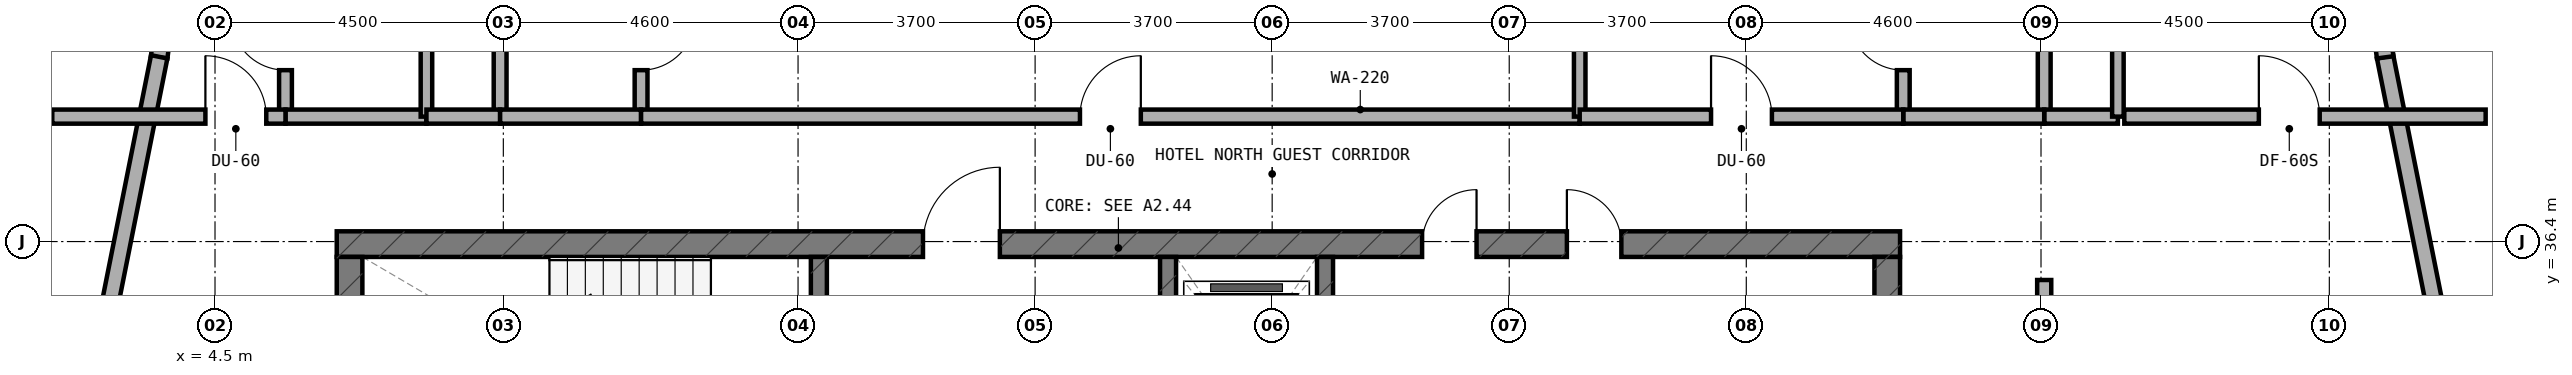
"""IFC4 building model, lengths in metres.
Left out: names, types, materials, properties, quantities, classifications, styles, units other than length and angle.
Written with IfcOpenShell. Run it as: python <this file> out.ifc"""

import sys

from ifc_helpers import new_model, si_unit, direction, frame, frame_2d, origin, place, context, subcontext, project, spatial, rectangle, extrude, element, fill, save


model = new_model("IFC4")
c1 = context("Model", 3, precision=1e-05, world=origin(), true_north=direction((0.0, 1.0)))
c2 = subcontext(c1, "Body", "Model", "MODEL_VIEW")
j1 = project(units=[si_unit("LENGTHUNIT", "METRE"), si_unit("PLANEANGLEUNIT", "RADIAN")], contexts=[c1])
p1 = place(None, origin())
s1 = spatial("IfcSite", under=j1, at=p1, CompositionType="ELEMENT")
p2 = place(p1, origin())
s2 = spatial("IfcBuilding", under=s1, at=p2, CompositionType="ELEMENT")
p3 = place(p2, frame((0.0, 0.0, 202.7)))
s3 = spatial("IfcBuildingStorey", under=s2, at=p3, CompositionType="ELEMENT", Elevation=202.7)
p4 = place(p3, frame((6.4, 36.36, 0.0), z_axis=(0.0, 0.0, 1.0), x_axis=(1.0, 0.0, 0.0)))
e1 = element("IfcWall", 1, at=p4, inside=s3, PredefinedType="SHEAR", context=c2, shape_type="SweptSolid", body=[
    extrude(rectangle(XDim=24.4, YDim=0.4, at=frame_2d((12.2, 0.0))), origin(), (0.0, 0.0, 1.0), 3.6),
])
p5 = place(p4, frame((9.15, 0.0, 0.0)))
e2 = element("IfcOpeningElement", 2, at=p5, cuts=e1, PredefinedType="OPENING", context=c2, shape_type="SweptSolid", body=[
    extrude(rectangle(XDim=1.2, YDim=2.15, at=frame_2d((0.6, 1.075))), frame((0.0, 0.21, 0.0), z_axis=(0.0, -1.0, 0.0), x_axis=(1.0, 0.0, 0.0)), (0.0, 0.0, 1.0), 0.42),
])
p6 = place(p4, frame((19.2, 0.0, 0.0)))
e3 = element("IfcOpeningElement", 3, at=p6, cuts=e1, PredefinedType="OPENING", context=c2, shape_type="SweptSolid", body=[
    extrude(rectangle(XDim=0.85, YDim=2.1, at=frame_2d((0.425, 1.05))), frame((0.0, 0.21, 0.0), z_axis=(0.0, -1.0, 0.0), x_axis=(1.0, 0.0, 0.0)), (0.0, 0.0, 1.0), 0.42),
])
p7 = place(p4, frame((16.94, 0.0, 0.0)))
e4 = element("IfcOpeningElement", 4, at=p7, cuts=e1, PredefinedType="OPENING", context=c2, shape_type="SweptSolid", body=[
    extrude(rectangle(XDim=0.85, YDim=2.1, at=frame_2d((0.425, 1.05))), frame((0.0, 0.21, 0.0), z_axis=(0.0, -1.0, 0.0), x_axis=(1.0, 0.0, 0.0)), (0.0, 0.0, 1.0), 0.42),
])
for number, where, z_axis, x_axis in (
    (5, (6.6, 33.0, 0.0), (0.0, 0.0, 1.0), (0.0, 1.0, 0.0)),
    (6, (30.6, 33.0, 0.0), (0.0, 0.0, 1.0), (0.0, 1.0, 0.0)),
):
    element("IfcWall", number, at=place(p3, frame(where, z_axis=z_axis, x_axis=x_axis)), inside=s3, PredefinedType="SHEAR", context=c2, shape_type="SweptSolid", body=[
        extrude(rectangle(XDim=3.16, YDim=0.4, at=frame_2d((1.58, 0.0))), origin(), (0.0, 0.0, 1.0), 3.6),
    ])
p8 = place(p3, frame((13.925, 33.0, 0.0), z_axis=(0.0, 0.0, 1.0), x_axis=(0.0, 1.0, 0.0)))
e7 = element("IfcWall", 7, at=p8, inside=s3, PredefinedType="STANDARD", context=c2, shape_type="SweptSolid", body=[
    extrude(rectangle(XDim=3.16, YDim=0.25, at=frame_2d((1.58, 0.0))), origin(), (0.0, 0.0, 1.0), 3.32),
])
p9 = place(p8, frame((0.98, 0.0, 0.0)))
e8 = element("IfcOpeningElement", 8, at=p9, cuts=e7, PredefinedType="OPENING", context=c2, shape_type="SweptSolid", body=[
    extrude(rectangle(XDim=1.1, YDim=2.15, at=frame_2d((0.55, 1.075))), frame((0.0, 0.135, 0.0), z_axis=(0.0, -1.0, 0.0), x_axis=(1.0, 0.0, 0.0)), (0.0, 0.0, 1.0), 0.27),
])
p10 = place(p3, frame((19.375, 33.0, 0.0), z_axis=(0.0, 0.0, 1.0), x_axis=(0.0, 1.0, 0.0)))
e9 = element("IfcWall", 9, at=p10, inside=s3, PredefinedType="STANDARD", context=c2, shape_type="SweptSolid", body=[
    extrude(rectangle(XDim=3.16, YDim=0.25, at=frame_2d((1.58, 0.0))), origin(), (0.0, 0.0, 1.0), 3.32),
])
p11 = place(p10, frame((0.98, 0.0, 0.0)))
e10 = element("IfcOpeningElement", 10, at=p11, cuts=e9, PredefinedType="OPENING", context=c2, shape_type="SweptSolid", body=[
    extrude(rectangle(XDim=1.1, YDim=2.15, at=frame_2d((0.55, 1.075))), frame((0.0, 0.135, 0.0), z_axis=(0.0, -1.0, 0.0), x_axis=(1.0, 0.0, 0.0)), (0.0, 0.0, 1.0), 0.27),
])
p12 = place(p3, frame((21.825, 33.0, 0.0), z_axis=(0.0, 0.0, 1.0), x_axis=(0.0, 1.0, 0.0)))
e11 = element("IfcWall", 11, at=p12, inside=s3, PredefinedType="STANDARD", context=c2, shape_type="SweptSolid", body=[
    extrude(rectangle(XDim=3.16, YDim=0.25, at=frame_2d((1.58, 0.0))), origin(), (0.0, 0.0, 1.0), 3.32),
])
p13 = place(p3, frame((40.084, 30.681, 0.0), z_axis=(0.0, 0.0, 1.0), x_axis=(-0.195291715883, 0.980745199176, 0.0)))
e12 = element("IfcWall", 12, at=p13, inside=s3, PredefinedType="STANDARD", context=c2, shape_type="SweptSolid", body=[
    extrude(rectangle(XDim=8.771, YDim=0.26, at=frame_2d((4.385, 0.0))), origin(), (0.0, 0.0, 1.0), 3.32),
])
p14 = place(p13, frame((2.798, 0.0, 0.85)))
e13 = element("IfcOpeningElement", 13, at=p14, cuts=e12, PredefinedType="OPENING", context=c2, shape_type="SweptSolid", body=[
    extrude(rectangle(XDim=2.1, YDim=1.5, at=frame_2d((1.05, 0.75))), frame((0.0, 0.14, 0.0), z_axis=(0.0, -1.0, 0.0), x_axis=(1.0, 0.0, 0.0)), (0.0, 0.0, 1.0), 0.28),
])
p15 = place(p3, frame((38.372, 39.275, 0.0), z_axis=(0.0, 0.0, 1.0), x_axis=(-0.130954667764, 0.9913883573, 0.0)))
e14 = element("IfcWall", 14, at=p15, inside=s3, PredefinedType="STANDARD", context=c2, shape_type="SweptSolid", body=[
    extrude(rectangle(XDim=0.833, YDim=0.26, at=frame_2d((0.417, 0.0))), origin(), (0.0, 0.0, 1.0), 3.32),
])
p16 = place(p3, frame((3.741, 40.136, 0.0), z_axis=(0.0, 0.0, 1.0), x_axis=(-0.130156359936, -0.991493480548, 0.0)))
e15 = element("IfcWall", 15, at=p16, inside=s3, PredefinedType="STANDARD", context=c2, shape_type="SweptSolid", body=[
    extrude(rectangle(XDim=0.868, YDim=0.26, at=frame_2d((0.434, 0.0))), origin(), (0.0, 0.0, 1.0), 3.32),
])
p17 = place(p16, frame((0.209, 0.0, 0.85)))
e16 = element("IfcOpeningElement", 16, at=p17, cuts=e15, PredefinedType="OPENING", context=c2, shape_type="SweptSolid", body=[
    extrude(rectangle(XDim=0.45, YDim=1.5, at=frame_2d((0.225, 0.75))), frame((0.0, 0.14, 0.0), z_axis=(0.0, -1.0, 0.0), x_axis=(1.0, 0.0, 0.0)), (0.0, 0.0, 1.0), 0.28),
])
p18 = place(p3, frame((3.629, 39.283, 0.0), z_axis=(0.0, 0.0, 1.0), x_axis=(-0.195291715883, -0.980745199176, 0.0)))
e17 = element("IfcWall", 17, at=p18, inside=s3, PredefinedType="STANDARD", context=c2, shape_type="SweptSolid", body=[
    extrude(rectangle(XDim=8.771, YDim=0.26, at=frame_2d((4.385, 0.0))), origin(), (0.0, 0.0, 1.0), 3.32),
])
p19 = place(p18, frame((3.873, 0.0, 0.85)))
e18 = element("IfcOpeningElement", 18, at=p19, cuts=e17, PredefinedType="OPENING", context=c2, shape_type="SweptSolid", body=[
    extrude(rectangle(XDim=2.1, YDim=1.5, at=frame_2d((1.05, 0.75))), frame((0.0, 0.14, 0.0), z_axis=(0.0, -1.0, 0.0), x_axis=(1.0, 0.0, 0.0)), (0.0, 0.0, 1.0), 0.28),
])
p20 = place(p3, frame((5.6, 38.45, 0.0), z_axis=(0.0, 0.0, 1.0), x_axis=(0.0, 1.0, 0.0)))
e19 = element("IfcWall", 19, at=p20, inside=s3, PredefinedType="PLUMBINGWALL", context=c2, shape_type="SweptSolid", body=[
    extrude(rectangle(XDim=2.1, YDim=0.2, at=frame_2d((1.05, 0.0))), origin(), (0.0, 0.0, 1.0), 3.32),
])
p21 = place(p20, frame((0.625, 0.0, 0.0)))
e20 = element("IfcOpeningElement", 20, at=p21, cuts=e19, PredefinedType="OPENING", context=c2, shape_type="SweptSolid", body=[
    extrude(rectangle(XDim=0.85, YDim=2.1, at=frame_2d((0.425, 1.05))), frame((0.0, 0.11, 0.0), z_axis=(0.0, -1.0, 0.0), x_axis=(1.0, 0.0, 0.0)), (0.0, 0.0, 1.0), 0.22),
])
p22 = place(p3, frame((5.6, 38.35, 0.0), z_axis=(0.0, 0.0, 1.0), x_axis=(1.0, 0.0, 0.0)))
e21 = element("IfcWall", 21, at=p22, inside=s3, PredefinedType="SOLIDWALL", context=c2, shape_type="SweptSolid", body=[
    extrude(rectangle(XDim=2.2, YDim=0.22, at=frame_2d((1.1, 0.0))), origin(), (0.0, 0.0, 1.0), 2.695),
])
p23 = place(p3, frame((1.96, 38.35, 0.0), z_axis=(0.0, 0.0, 1.0), x_axis=(1.0, 0.0, 0.0)))
e22 = element("IfcWall", 22, at=p23, inside=s3, PredefinedType="SOLIDWALL", context=c2, shape_type="SweptSolid", body=[
    extrude(rectangle(XDim=3.64, YDim=0.22, at=frame_2d((1.82, 0.0))), origin(), (0.0, 0.0, 1.0), 3.32),
])
p24 = place(p23, frame((2.39, 0.0, 0.0)))
e23 = element("IfcOpeningElement", 23, at=p24, cuts=e22, PredefinedType="OPENING", context=c2, shape_type="SweptSolid", body=[
    extrude(rectangle(XDim=0.95, YDim=2.1, at=frame_2d((0.475, 1.05))), frame((0.0, 0.12, 0.0), z_axis=(0.0, -1.0, 0.0), x_axis=(1.0, 0.0, 0.0)), (0.0, 0.0, 1.0), 0.24),
])
p25 = place(p3, frame((7.8, 38.35, 0.0), z_axis=(0.0, 0.0, 1.0), x_axis=(0.0, 1.0, 0.0)))
e24 = element("IfcWall", 24, at=p25, inside=s3, PredefinedType="SOLIDWALL", context=c2, shape_type="SweptSolid", body=[
    extrude(rectangle(XDim=4.308, YDim=0.18, at=frame_2d((2.154, 0.0))), origin(), (0.0, 0.0, 1.0), 2.695),
])
p26 = place(p3, frame((11.15, 38.45, 0.0), z_axis=(0.0, 0.0, 1.0), x_axis=(0.0, 1.0, 0.0)))
e25 = element("IfcWall", 25, at=p26, inside=s3, PredefinedType="PLUMBINGWALL", context=c2, shape_type="SweptSolid", body=[
    extrude(rectangle(XDim=2.1, YDim=0.2, at=frame_2d((1.05, 0.0))), origin(), (0.0, 0.0, 1.0), 2.845),
])
p27 = place(p26, frame((0.625, 0.0, 0.0)))
e26 = element("IfcOpeningElement", 26, at=p27, cuts=e25, PredefinedType="OPENING", context=c2, shape_type="SweptSolid", body=[
    extrude(rectangle(XDim=0.85, YDim=2.1, at=frame_2d((0.425, 1.05))), frame((0.0, 0.11, 0.0), z_axis=(0.0, -1.0, 0.0), x_axis=(1.0, 0.0, 0.0)), (0.0, 0.0, 1.0), 0.22),
])
p28 = place(p3, frame((8.95, 38.45, 0.0), z_axis=(0.0, 0.0, 1.0), x_axis=(0.0, 1.0, 0.0)))
e27 = element("IfcWall", 27, at=p28, inside=s3, PredefinedType="PLUMBINGWALL", context=c2, shape_type="SweptSolid", body=[
    extrude(rectangle(XDim=2.1, YDim=0.2, at=frame_2d((1.05, 0.0))), origin(), (0.0, 0.0, 1.0), 2.845),
])
p29 = place(p3, frame((7.8, 38.35, 0.0), z_axis=(0.0, 0.0, 1.0), x_axis=(1.0, 0.0, 0.0)))
e28 = element("IfcWall", 28, at=p29, inside=s3, PredefinedType="SOLIDWALL", context=c2, shape_type="SweptSolid", body=[
    extrude(rectangle(XDim=1.15, YDim=0.22, at=frame_2d((0.575, 0.0))), origin(), (0.0, 0.0, 1.0), 2.695),
])
p30 = place(p3, frame((8.95, 38.35, 0.0), z_axis=(0.0, 0.0, 1.0), x_axis=(1.0, 0.0, 0.0)))
e29 = element("IfcWall", 29, at=p30, inside=s3, PredefinedType="SOLIDWALL", context=c2, shape_type="SweptSolid", body=[
    extrude(rectangle(XDim=2.2, YDim=0.22, at=frame_2d((1.1, 0.0))), origin(), (0.0, 0.0, 1.0), 3.32),
])
p31 = place(p3, frame((11.15, 38.35, 0.0), z_axis=(0.0, 0.0, 1.0), x_axis=(1.0, 0.0, 0.0)))
e30 = element("IfcWall", 30, at=p31, inside=s3, PredefinedType="SOLIDWALL", context=c2, shape_type="SweptSolid", body=[
    extrude(rectangle(XDim=14.65, YDim=0.22, at=frame_2d((7.325, 0.0))), origin(), (0.0, 0.0, 1.0), 2.695),
])
p32 = place(p31, frame((6.85, 0.0, 0.0)))
e31 = element("IfcOpeningElement", 31, at=p32, cuts=e30, PredefinedType="OPENING", context=c2, shape_type="SweptSolid", body=[
    extrude(rectangle(XDim=0.95, YDim=2.1, at=frame_2d((0.475, 1.05))), frame((0.0, 0.12, 0.0), z_axis=(0.0, -1.0, 0.0), x_axis=(1.0, 0.0, 0.0)), (0.0, 0.0, 1.0), 0.24),
])
p33 = place(p3, frame((25.8, 38.35, 0.0), z_axis=(0.0, 0.0, 1.0), x_axis=(0.0, 1.0, 0.0)))
e32 = element("IfcWall", 32, at=p33, inside=s3, PredefinedType="SOLIDWALL", context=c2, shape_type="SweptSolid", body=[
    extrude(rectangle(XDim=5.79, YDim=0.18, at=frame_2d((2.895, 0.0))), origin(), (0.0, 0.0, 1.0), 2.695),
])
p34 = place(p3, frame((30.85, 38.45, 0.0), z_axis=(0.0, 0.0, 1.0), x_axis=(0.0, 1.0, 0.0)))
e33 = element("IfcWall", 33, at=p34, inside=s3, PredefinedType="PLUMBINGWALL", context=c2, shape_type="SweptSolid", body=[
    extrude(rectangle(XDim=2.1, YDim=0.2, at=frame_2d((1.05, 0.0))), origin(), (0.0, 0.0, 1.0), 2.845),
])
p35 = place(p34, frame((0.625, 0.0, 0.0)))
e34 = element("IfcOpeningElement", 34, at=p35, cuts=e33, PredefinedType="OPENING", context=c2, shape_type="SweptSolid", body=[
    extrude(rectangle(XDim=0.85, YDim=2.1, at=frame_2d((0.425, 1.05))), frame((0.0, 0.11, 0.0), z_axis=(0.0, -1.0, 0.0), x_axis=(1.0, 0.0, 0.0)), (0.0, 0.0, 1.0), 0.22),
])
p36 = place(p3, frame((33.05, 38.45, 0.0), z_axis=(0.0, 0.0, 1.0), x_axis=(0.0, 1.0, 0.0)))
e35 = element("IfcWall", 35, at=p36, inside=s3, PredefinedType="PLUMBINGWALL", context=c2, shape_type="SweptSolid", body=[
    extrude(rectangle(XDim=2.1, YDim=0.2, at=frame_2d((1.05, 0.0))), origin(), (0.0, 0.0, 1.0), 2.845),
])
p37 = place(p3, frame((33.05, 38.35, 0.0), z_axis=(0.0, 0.0, 1.0), x_axis=(1.0, 0.0, 0.0)))
e36 = element("IfcWall", 36, at=p37, inside=s3, PredefinedType="SOLIDWALL", context=c2, shape_type="SweptSolid", body=[
    extrude(rectangle(XDim=1.15, YDim=0.22, at=frame_2d((0.575, 0.0))), origin(), (0.0, 0.0, 1.0), 2.695),
])
p38 = place(p3, frame((30.85, 38.35, 0.0), z_axis=(0.0, 0.0, 1.0), x_axis=(1.0, 0.0, 0.0)))
e37 = element("IfcWall", 37, at=p38, inside=s3, PredefinedType="SOLIDWALL", context=c2, shape_type="SweptSolid", body=[
    extrude(rectangle(XDim=2.2, YDim=0.22, at=frame_2d((1.1, 0.0))), origin(), (0.0, 0.0, 1.0), 3.32),
])
p39 = place(p3, frame((25.8, 38.35, 0.0), z_axis=(0.0, 0.0, 1.0), x_axis=(1.0, 0.0, 0.0)))
e38 = element("IfcWall", 38, at=p39, inside=s3, PredefinedType="SOLIDWALL", context=c2, shape_type="SweptSolid", body=[
    extrude(rectangle(XDim=5.05, YDim=0.22, at=frame_2d((2.525, 0.0))), origin(), (0.0, 0.0, 1.0), 2.695),
])
p40 = place(p39, frame((2.05, 0.0, 0.0)))
e39 = element("IfcOpeningElement", 39, at=p40, cuts=e38, PredefinedType="OPENING", context=c2, shape_type="SweptSolid", body=[
    extrude(rectangle(XDim=0.95, YDim=2.1, at=frame_2d((0.475, 1.05))), frame((0.0, 0.12, 0.0), z_axis=(0.0, -1.0, 0.0), x_axis=(1.0, 0.0, 0.0)), (0.0, 0.0, 1.0), 0.24),
])
p41 = place(p3, frame((34.2, 38.35, 0.0), z_axis=(0.0, 0.0, 1.0), x_axis=(0.0, 1.0, 0.0)))
e40 = element("IfcWall", 40, at=p41, inside=s3, PredefinedType="SOLIDWALL", context=c2, shape_type="SweptSolid", body=[
    extrude(rectangle(XDim=4.308, YDim=0.18, at=frame_2d((2.154, 0.0))), origin(), (0.0, 0.0, 1.0), 2.695),
])
p42 = place(p3, frame((34.3, 38.35, 0.0), z_axis=(0.0, 0.0, 1.0), x_axis=(1.0, 0.0, 0.0)))
e41 = element("IfcWall", 41, at=p42, inside=s3, PredefinedType="SOLIDWALL", context=c2, shape_type="SweptSolid", body=[
    extrude(rectangle(XDim=5.64, YDim=0.22, at=frame_2d((2.82, 0.0))), origin(), (0.0, 0.0, 1.0), 3.015),
])
p43 = place(p42, frame((2.1, 0.0, 0.0)))
e42 = element("IfcOpeningElement", 42, at=p43, cuts=e41, PredefinedType="OPENING", context=c2, shape_type="SweptSolid", body=[
    extrude(rectangle(XDim=0.95, YDim=2.1, at=frame_2d((0.475, 1.05))), frame((0.0, 0.12, 0.0), z_axis=(0.0, -1.0, 0.0), x_axis=(1.0, 0.0, 0.0)), (0.0, 0.0, 1.0), 0.24),
])
p44 = place(p3, frame((33.05, 30.593, 0.0), z_axis=(0.0, 0.0, 1.0), x_axis=(0.0, 1.0, 0.0)))
e43 = element("IfcWall", 43, at=p44, inside=s3, PredefinedType="SOLIDWALL", context=c2, shape_type="SweptSolid", body=[
    extrude(rectangle(XDim=5.207, YDim=0.22, at=frame_2d((2.604, 0.0))), origin(), (0.0, 0.0, 1.0), 2.695),
])
p45 = place(p44, frame((2.128, 0.0, 0.0)))
e44 = element("IfcOpeningElement", 44, at=p45, cuts=e43, PredefinedType="OPENING", context=c2, shape_type="SweptSolid", body=[
    extrude(rectangle(XDim=0.95, YDim=2.1, at=frame_2d((0.475, 1.05))), frame((0.0, 0.12, 0.0), z_axis=(0.0, -1.0, 0.0), x_axis=(1.0, 0.0, 0.0)), (0.0, 0.0, 1.0), 0.24),
])
p46 = place(p5, origin())
e45 = element("IfcDoor", 45, at=p46, inside=s3, OperationType="SINGLE_SWING_RIGHT", PredefinedType="DOOR", context=c2, shape_type="SweptSolid", body=[
    extrude(rectangle(XDim=1.2, YDim=2.15, at=frame_2d((0.6, 1.075))), frame((0.0, 0.025, 0.0), z_axis=(0.0, -1.0, 0.0), x_axis=(1.0, 0.0, 0.0)), (0.0, 0.0, 1.0), 0.05),
])
fill(e2, e45)
p47 = place(p6, origin())
e46 = element("IfcDoor", 46, at=p47, inside=s3, OperationType="SINGLE_SWING_LEFT", PredefinedType="DOOR", context=c2, shape_type="SweptSolid", body=[
    extrude(rectangle(XDim=0.85, YDim=2.1, at=frame_2d((0.425, 1.05))), frame((0.0, 0.025, 0.0), z_axis=(0.0, -1.0, 0.0), x_axis=(1.0, 0.0, 0.0)), (0.0, 0.0, 1.0), 0.05),
])
fill(e3, e46)
p48 = place(p7, origin())
e47 = element("IfcDoor", 47, at=p48, inside=s3, OperationType="SINGLE_SWING_RIGHT", PredefinedType="DOOR", context=c2, shape_type="SweptSolid", body=[
    extrude(rectangle(XDim=0.85, YDim=2.1, at=frame_2d((0.425, 1.05))), frame((0.0, 0.025, 0.0), z_axis=(0.0, -1.0, 0.0), x_axis=(1.0, 0.0, 0.0)), (0.0, 0.0, 1.0), 0.05),
])
fill(e4, e47)
p49 = place(p21, origin())
e48 = element("IfcDoor", 48, at=p49, inside=s3, OperationType="SINGLE_SWING_RIGHT", PredefinedType="DOOR", context=c2, shape_type="SweptSolid", body=[
    extrude(rectangle(XDim=0.85, YDim=2.1, at=frame_2d((0.425, 1.05))), frame((0.0, 0.025, 0.0), z_axis=(0.0, -1.0, 0.0), x_axis=(1.0, 0.0, 0.0)), (0.0, 0.0, 1.0), 0.05),
])
fill(e20, e48)
p50 = place(p24, origin())
e49 = element("IfcDoor", 49, at=p50, inside=s3, OperationType="SINGLE_SWING_LEFT", PredefinedType="DOOR", context=c2, shape_type="SweptSolid", body=[
    extrude(rectangle(XDim=0.95, YDim=2.1, at=frame_2d((0.475, 1.05))), frame((0.0, 0.025, 0.0), z_axis=(0.0, -1.0, 0.0), x_axis=(1.0, 0.0, 0.0)), (0.0, 0.0, 1.0), 0.05),
])
fill(e23, e49)
p51 = place(p27, frame((0.85, 0.0, 0.0), z_axis=(0.0, 0.0, 1.0), x_axis=(-1.0, 0.0, 0.0)))
e50 = element("IfcDoor", 50, at=p51, inside=s3, OperationType="SINGLE_SWING_LEFT", PredefinedType="DOOR", context=c2, shape_type="SweptSolid", body=[
    extrude(rectangle(XDim=0.85, YDim=2.1, at=frame_2d((0.425, 1.05))), frame((0.0, 0.025, 0.0), z_axis=(0.0, -1.0, 0.0), x_axis=(1.0, 0.0, 0.0)), (0.0, 0.0, 1.0), 0.05),
])
fill(e26, e50)
p52 = place(p32, origin())
e51 = element("IfcDoor", 51, at=p52, inside=s3, OperationType="SINGLE_SWING_RIGHT", PredefinedType="DOOR", context=c2, shape_type="SweptSolid", body=[
    extrude(rectangle(XDim=0.95, YDim=2.1, at=frame_2d((0.475, 1.05))), frame((0.0, 0.025, 0.0), z_axis=(0.0, -1.0, 0.0), x_axis=(1.0, 0.0, 0.0)), (0.0, 0.0, 1.0), 0.05),
])
fill(e31, e51)
p53 = place(p35, origin())
e52 = element("IfcDoor", 52, at=p53, inside=s3, OperationType="SINGLE_SWING_RIGHT", PredefinedType="DOOR", context=c2, shape_type="SweptSolid", body=[
    extrude(rectangle(XDim=0.85, YDim=2.1, at=frame_2d((0.425, 1.05))), frame((0.0, 0.025, 0.0), z_axis=(0.0, -1.0, 0.0), x_axis=(1.0, 0.0, 0.0)), (0.0, 0.0, 1.0), 0.05),
])
fill(e34, e52)
p54 = place(p40, origin())
e53 = element("IfcDoor", 53, at=p54, inside=s3, OperationType="SINGLE_SWING_LEFT", PredefinedType="DOOR", context=c2, shape_type="SweptSolid", body=[
    extrude(rectangle(XDim=0.95, YDim=2.1, at=frame_2d((0.475, 1.05))), frame((0.0, 0.025, 0.0), z_axis=(0.0, -1.0, 0.0), x_axis=(1.0, 0.0, 0.0)), (0.0, 0.0, 1.0), 0.05),
])
fill(e39, e53)
p55 = place(p43, origin())
e54 = element("IfcDoor", 54, at=p55, inside=s3, OperationType="SINGLE_SWING_LEFT", PredefinedType="DOOR", context=c2, shape_type="SweptSolid", body=[
    extrude(rectangle(XDim=0.95, YDim=2.1, at=frame_2d((0.475, 1.05))), frame((0.0, 0.025, 0.0), z_axis=(0.0, -1.0, 0.0), x_axis=(1.0, 0.0, 0.0)), (0.0, 0.0, 1.0), 0.05),
])
fill(e42, e54)
save(model, sys.argv[1])
